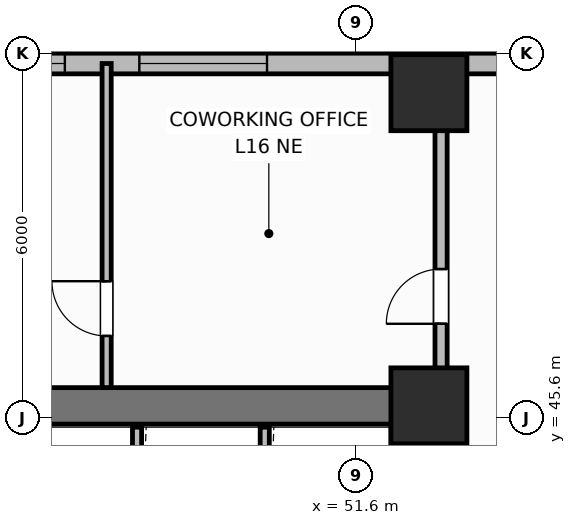
"""IFC4 building model, lengths in metres.
Left out: names, types, materials, properties, quantities, classifications, styles, units other than length and angle.
Written with IfcOpenShell. Run it as: python <this file> out.ifc"""

import sys

from ifc_helpers import new_model, si_unit, direction, frame, frame_2d, origin, origin_2d, place, context, subcontext, project, spatial, rectangle, extrude, element, fill, save


model = new_model("IFC4")
c1 = context("Model", 3, precision=1e-05, world=origin(), true_north=direction((0.0, 1.0)))
c2 = subcontext(c1, "Body", "Model", "MODEL_VIEW")
j1 = project(units=[si_unit("LENGTHUNIT", "METRE"), si_unit("PLANEANGLEUNIT", "RADIAN")], contexts=[c1])
p1 = place(None, origin())
s1 = spatial("IfcSite", under=j1, at=p1, CompositionType="ELEMENT")
p2 = place(p1, origin())
s2 = spatial("IfcBuilding", under=s1, at=p2, CompositionType="ELEMENT")
p3 = place(p2, frame((0.0, 0.0, 65.8)))
s3 = spatial("IfcBuildingStorey", under=s2, at=p3, CompositionType="ELEMENT", Elevation=65.8)
p4 = place(p3, frame((25.6, 45.8, 0.0), z_axis=(0.0, 0.0, 1.0), x_axis=(1.0, 0.0, 0.0)))
e1 = element("IfcWall", 1, at=p4, inside=s3, PredefinedType="SHEAR", context=c2, shape_type="SweptSolid", body=[
    extrude(rectangle(XDim=27.2, YDim=0.6, at=frame_2d((13.6, 0.0))), origin(), (0.0, 0.0, 1.0), 3.7),
])
p5 = place(p3, frame((52.8, 39.9, 0.0), z_axis=(0.0, 0.0, 1.0), x_axis=(0.0, 1.0, 0.0)))
e2 = element("IfcWall", 2, at=p5, inside=s3, PredefinedType="SHEAR", context=c2, shape_type="SweptSolid", body=[
    extrude(rectangle(XDim=5.6, YDim=0.6, at=frame_2d((2.8, 0.0))), origin(), (0.0, 0.0, 1.0), 3.7),
])
for number, where, z_axis, x_axis in (
    (3, (52.8, 45.8, 0.0), (0.0, 0.0, 1.0), (1.0, 0.0, 0.0)),
    (4, (52.8, 50.95, 0.0), (0.0, 0.0, 1.0), (1.0, 0.0, 0.0)),
):
    element("IfcColumn", number, at=place(p3, frame(where, z_axis=z_axis, x_axis=x_axis)), inside=s3, PredefinedType="COLUMN", context=c2, shape_type="SweptSolid", body=[
        extrude(rectangle(XDim=1.25, YDim=1.25, at=origin_2d()), origin(), (0.0, 0.0, 1.0), 3.7),
    ])
p6 = place(p3, frame((59.8, 51.43, 0.0), z_axis=(0.0, 0.0, 1.0), x_axis=(-1.0, 0.0, 0.0)))
e5 = element("IfcWall", 5, at=p6, inside=s3, PredefinedType="SOLIDWALL", context=c2, shape_type="SweptSolid", body=[
    extrude(rectangle(XDim=17.4, YDim=0.34, at=frame_2d((8.7, 0.0))), origin(), (0.0, 0.0, 1.0), 2.7),
])
p7 = place(p6, frame((1.613, 0.0, 0.68)))
e6 = element("IfcOpeningElement", 6, at=p7, cuts=e5, PredefinedType="OPENING", context=c2, shape_type="SweptSolid", body=[
    extrude(rectangle(XDim=2.1, YDim=1.9, at=frame_2d((1.05, 0.95))), frame((0.0, 0.18, 0.0), z_axis=(0.0, -1.0, 0.0), x_axis=(1.0, 0.0, 0.0)), (0.0, 0.0, 1.0), 0.36),
])
p8 = place(p6, frame((9.663, 0.0, 0.68)))
e7 = element("IfcOpeningElement", 7, at=p8, cuts=e5, PredefinedType="OPENING", context=c2, shape_type="SweptSolid", body=[
    extrude(rectangle(XDim=2.1, YDim=1.9, at=frame_2d((1.05, 0.95))), frame((0.0, 0.18, 0.0), z_axis=(0.0, -1.0, 0.0), x_axis=(1.0, 0.0, 0.0)), (0.0, 0.0, 1.0), 0.36),
])
p9 = place(p6, frame((12.988, 0.0, 0.68)))
e8 = element("IfcOpeningElement", 8, at=p9, cuts=e5, PredefinedType="OPENING", context=c2, shape_type="SweptSolid", body=[
    extrude(rectangle(XDim=2.1, YDim=1.9, at=frame_2d((1.05, 0.95))), frame((0.0, 0.18, 0.0), z_axis=(0.0, -1.0, 0.0), x_axis=(1.0, 0.0, 0.0)), (0.0, 0.0, 1.0), 0.36),
])
for number, where, z_axis, x_axis in (
    (9, (48.0, 42.65, 0.0), (0.0, 0.0, 1.0), (0.0, 1.0, 0.0)),
    (10, (50.1, 42.65, 0.0), (0.0, 0.0, 1.0), (0.0, 1.0, 0.0)),
):
    element("IfcWall", number, at=place(p3, frame(where, z_axis=z_axis, x_axis=x_axis)), inside=s3, PredefinedType="PARTITIONING", context=c2, shape_type="SweptSolid", body=[
        extrude(rectangle(XDim=2.8, YDim=0.15, at=frame_2d((1.4, 0.0))), origin(), (0.0, 0.0, 1.0), 2.53),
    ])
p10 = place(p3, frame((47.5, 46.1, 0.0), z_axis=(0.0, 0.0, 1.0), x_axis=(0.0, 1.0, 0.0)))
e11 = element("IfcWall", 11, at=p10, inside=s3, PredefinedType="PARTITIONING", context=c2, shape_type="SweptSolid", body=[
    extrude(rectangle(XDim=5.33, YDim=0.15, at=frame_2d((2.665, 0.0))), origin(), (0.0, 0.0, 1.0), 2.53),
])
p11 = place(p10, frame((0.85, 0.0, 0.0)))
e12 = element("IfcOpeningElement", 12, at=p11, cuts=e11, PredefinedType="OPENING", context=c2, shape_type="SweptSolid", body=[
    extrude(rectangle(XDim=0.9, YDim=2.1, at=frame_2d((0.45, 1.05))), frame((0.0, 0.085, 0.0), z_axis=(0.0, -1.0, 0.0), x_axis=(1.0, 0.0, 0.0)), (0.0, 0.0, 1.0), 0.17),
])
p12 = place(p3, frame((53.0, 46.1, 0.0), z_axis=(0.0, 0.0, 1.0), x_axis=(0.0, 1.0, 0.0)))
e13 = element("IfcWall", 13, at=p12, inside=s3, PredefinedType="PARTITIONING", context=c2, shape_type="SweptSolid", body=[
    extrude(rectangle(XDim=4.58, YDim=0.2, at=frame_2d((2.29, 0.0))), origin(), (0.0, 0.0, 1.0), 2.53),
])
p13 = place(p12, frame((1.05, 0.0, 0.0)))
e14 = element("IfcOpeningElement", 14, at=p13, cuts=e13, PredefinedType="OPENING", context=c2, shape_type="SweptSolid", body=[
    extrude(rectangle(XDim=0.9, YDim=2.1, at=frame_2d((0.45, 1.05))), frame((0.0, 0.11, 0.0), z_axis=(0.0, -1.0, 0.0), x_axis=(1.0, 0.0, 0.0)), (0.0, 0.0, 1.0), 0.22),
])
p14 = place(p8, origin())
e15 = element("IfcWindow", 15, at=p14, inside=s3, PartitioningType="SINGLE_PANEL", PredefinedType="WINDOW", context=c2, shape_type="SweptSolid", body=[
    extrude(rectangle(XDim=2.1, YDim=1.9, at=frame_2d((1.05, 0.95))), frame((0.0, 0.03, 0.0), z_axis=(0.0, -1.0, 0.0), x_axis=(1.0, 0.0, 0.0)), (0.0, 0.0, 1.0), 0.06),
])
fill(e7, e15)
p15 = place(p9, origin())
e16 = element("IfcWindow", 16, at=p15, inside=s3, PartitioningType="SINGLE_PANEL", PredefinedType="WINDOW", context=c2, shape_type="SweptSolid", body=[
    extrude(rectangle(XDim=2.1, YDim=1.9, at=frame_2d((1.05, 0.95))), frame((0.0, 0.03, 0.0), z_axis=(0.0, -1.0, 0.0), x_axis=(1.0, 0.0, 0.0)), (0.0, 0.0, 1.0), 0.06),
])
fill(e8, e16)
p16 = place(p11, origin())
e17 = element("IfcDoor", 17, at=p16, inside=s3, OperationType="SINGLE_SWING_RIGHT", PredefinedType="DOOR", context=c2, shape_type="SweptSolid", body=[
    extrude(rectangle(XDim=0.9, YDim=2.1, at=frame_2d((0.45, 1.05))), frame((0.0, 0.025, 0.0), z_axis=(0.0, -1.0, 0.0), x_axis=(1.0, 0.0, 0.0)), (0.0, 0.0, 1.0), 0.05),
])
fill(e12, e17)
p17 = place(p13, origin())
e18 = element("IfcDoor", 18, at=p17, inside=s3, OperationType="SINGLE_SWING_LEFT", PredefinedType="DOOR", context=c2, shape_type="SweptSolid", body=[
    extrude(rectangle(XDim=0.9, YDim=2.1, at=frame_2d((0.45, 1.05))), frame((0.0, 0.025, 0.0), z_axis=(0.0, -1.0, 0.0), x_axis=(1.0, 0.0, 0.0)), (0.0, 0.0, 1.0), 0.05),
])
fill(e14, e18)
save(model, sys.argv[1])
